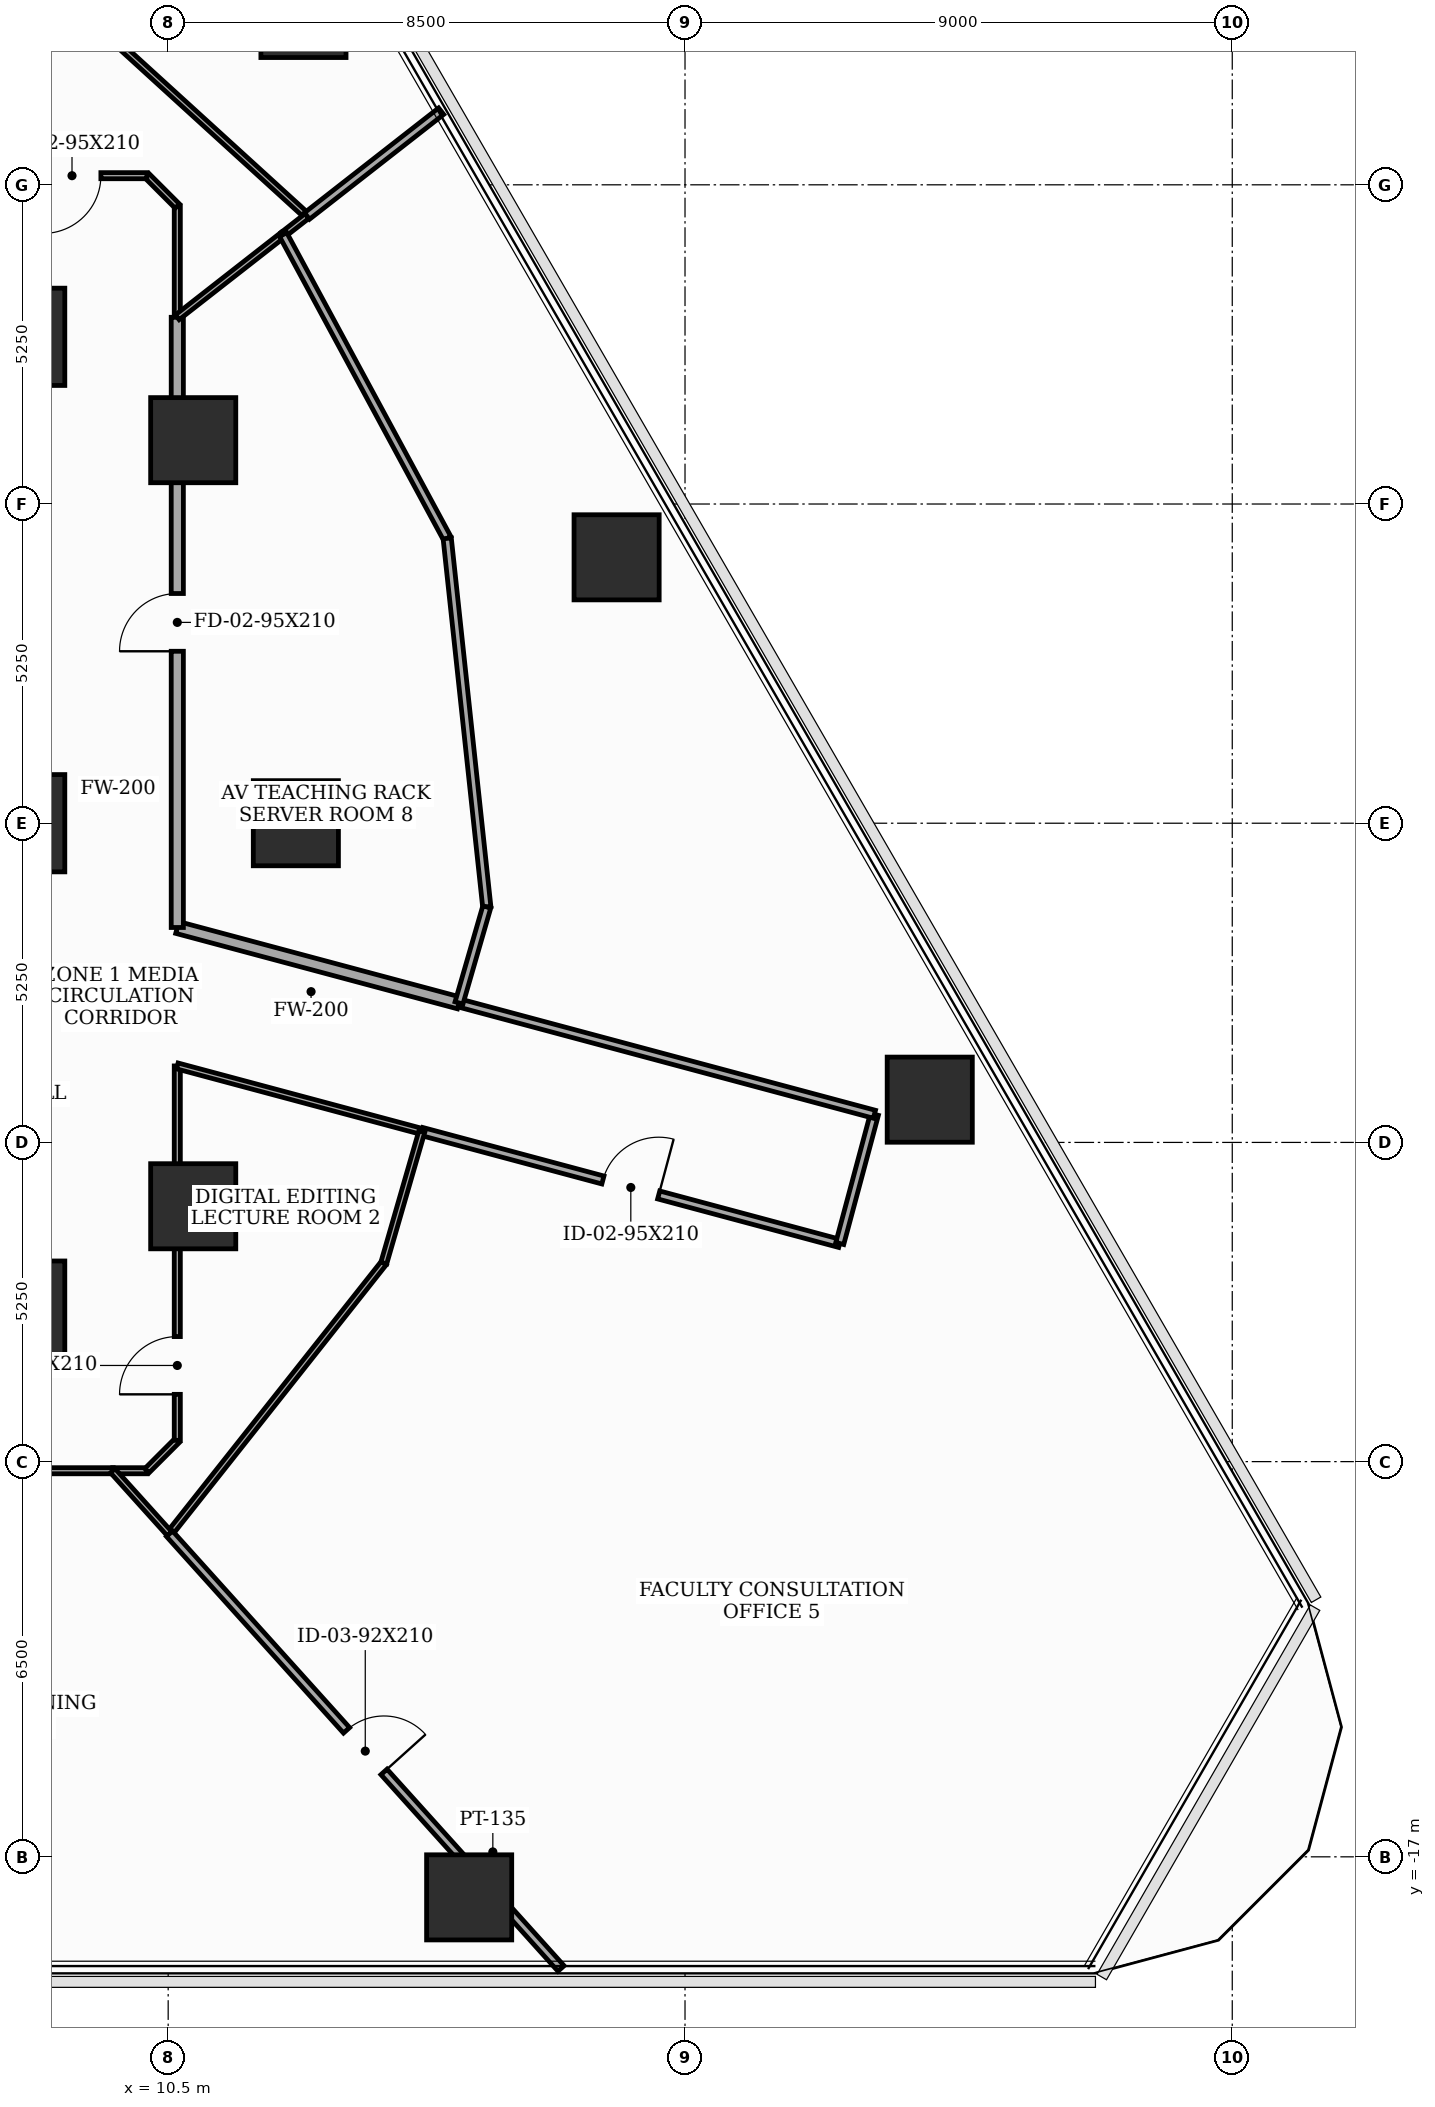
"""IFC4 building model, lengths in metres.
Left out: names, types, materials, properties, quantities, classifications, styles, units other than length and angle.
Written with IfcOpenShell. Run it as: python <this file> out.ifc"""

import sys

from ifc_helpers import new_model, si_unit, direction, frame, frame_2d, origin, origin_2d, place, context, subcontext, project, spatial, rectangle, extrude, element, fill, save


model = new_model("IFC4")
c1 = context("Model", 3, precision=1e-05, world=origin(), true_north=direction((0.0, 1.0)))
c2 = subcontext(c1, "Body", "Model", "MODEL_VIEW")
j1 = project(units=[si_unit("LENGTHUNIT", "METRE"), si_unit("PLANEANGLEUNIT", "RADIAN")], contexts=[c1])
p1 = place(None, origin())
s1 = spatial("IfcSite", under=j1, at=p1, CompositionType="ELEMENT")
p2 = place(p1, origin())
s2 = spatial("IfcBuilding", under=s1, at=p2, CompositionType="ELEMENT")
p3 = place(p2, frame((0.0, 0.0, 48.2)))
s3 = spatial("IfcBuildingStorey", under=s2, at=p3, CompositionType="ELEMENT", Elevation=48.2)
for number, where, z_axis, x_axis in (
    (1, (8.0, -8.0, 0.0), (0.0, 0.0, 1.0), (1.0, 0.0, 0.0)),
    (2, (8.0, 0.0, 0.0), (0.0, 0.0, 1.0), (1.0, 0.0, 0.0)),
    (3, (8.0, 8.0, 0.0), (0.0, 0.0, 1.0), (1.0, 0.0, 0.0)),
):
    element("IfcColumn", number, at=place(p3, frame(where, z_axis=z_axis, x_axis=x_axis)), inside=s3, PredefinedType="COLUMN", context=c2, shape_type="SweptSolid", body=[
        extrude(rectangle(XDim=1.6, YDim=1.6, at=origin_2d()), origin(), (0.0, 0.0, 1.0), 3.7),
    ])
for number, where, z_axis, x_axis in (
    (4, (12.6, 0.0, 0.0), (0.0, 0.0, 1.0), (1.0, 0.0, 0.0)),
    (5, (10.912, 6.3, 0.0), (0.0, 0.0, 1.0), (1.0, 0.0, 0.0)),
    (6, (10.912, -6.3, 0.0), (0.0, 0.0, 1.0), (1.0, 0.0, 0.0)),
    (7, (15.45, -17.667, 0.0), (0.0, 0.0, 1.0), (1.0, 0.0, 0.0)),
    (8, (23.025, -4.547, 0.0), (0.0, 0.0, 1.0), (1.0, 0.0, 0.0)),
    (9, (17.875, 4.373, 0.0), (0.0, 0.0, 1.0), (1.0, 0.0, 0.0)),
    (10, (12.725, 13.293, 0.0), (0.0, 0.0, 1.0), (1.0, 0.0, 0.0)),
):
    element("IfcColumn", number, at=place(p3, frame(where, z_axis=z_axis, x_axis=x_axis)), inside=s3, PredefinedType="COLUMN", context=c2, shape_type="SweptSolid", body=[
        extrude(rectangle(XDim=1.4, YDim=1.4, at=origin_2d()), origin(), (0.0, 0.0, 1.0), 3.7),
    ])
p4 = place(p3, frame((10.65, 8.321, 0.0), z_axis=(0.0, 0.0, 1.0), x_axis=(0.0, 1.0, 0.0)))
e11 = element("IfcWall", 11, at=p4, inside=s3, PredefinedType="MOVABLE", context=c2, shape_type="SweptSolid", body=[
    extrude(rectangle(XDim=1.829, YDim=0.1, at=frame_2d((0.915, 0.0))), origin(), (0.0, 0.0, 1.0), 3.5),
])
p5 = place(p3, frame((10.65, 10.15, 0.0), z_axis=(0.0, 0.0, 1.0), x_axis=(-0.707106781187, 0.707106781187, 0.0)))
e12 = element("IfcWall", 12, at=p5, inside=s3, PredefinedType="MOVABLE", context=c2, shape_type="SweptSolid", body=[
    extrude(rectangle(XDim=0.707, YDim=0.1, at=frame_2d((0.354, 0.0))), origin(), (0.0, 0.0, 1.0), 3.5),
])
p6 = place(p3, frame((10.15, 10.65, 0.0), z_axis=(0.0, 0.0, 1.0), x_axis=(-1.0, 0.0, 0.0)))
e13 = element("IfcWall", 13, at=p6, inside=s3, PredefinedType="MOVABLE", context=c2, shape_type="SweptSolid", body=[
    extrude(rectangle(XDim=6.158, YDim=0.1, at=frame_2d((3.079, 0.0))), origin(), (0.0, 0.0, 1.0), 2.685),
])
p7 = place(p6, frame((0.757, 0.0, 0.0)))
e14 = element("IfcOpeningElement", 14, at=p7, cuts=e13, PredefinedType="OPENING", context=c2, shape_type="SweptSolid", body=[
    extrude(rectangle(XDim=0.95, YDim=2.1, at=frame_2d((0.475, 1.05))), frame((0.0, 0.06, 0.0), z_axis=(0.0, -1.0, 0.0), x_axis=(1.0, 0.0, 0.0)), (0.0, 0.0, 1.0), 0.12),
])
p8 = place(p3, frame((9.589, -10.65, 0.0), z_axis=(0.0, 0.0, 1.0), x_axis=(1.0, 0.0, 0.0)))
e15 = element("IfcWall", 15, at=p8, inside=s3, PredefinedType="MOVABLE", context=c2, shape_type="SweptSolid", body=[
    extrude(rectangle(XDim=0.561, YDim=0.1, at=frame_2d((0.28, 0.0))), origin(), (0.0, 0.0, 1.0), 3.5),
])
p9 = place(p3, frame((10.15, -10.65, 0.0), z_axis=(0.0, 0.0, 1.0), x_axis=(0.707106781187, 0.707106781187, 0.0)))
e16 = element("IfcWall", 16, at=p9, inside=s3, PredefinedType="MOVABLE", context=c2, shape_type="SweptSolid", body=[
    extrude(rectangle(XDim=0.707, YDim=0.1, at=frame_2d((0.354, 0.0))), origin(), (0.0, 0.0, 1.0), 3.5),
])
p10 = place(p3, frame((10.65, -10.15, 0.0), z_axis=(0.0, 0.0, 1.0), x_axis=(0.0, 1.0, 0.0)))
e17 = element("IfcWall", 17, at=p10, inside=s3, PredefinedType="MOVABLE", context=c2, shape_type="SweptSolid", body=[
    extrude(rectangle(XDim=6.158, YDim=0.1, at=frame_2d((3.079, 0.0))), origin(), (0.0, 0.0, 1.0), 2.785),
])
p11 = place(p10, frame((0.757, 0.0, 0.0)))
e18 = element("IfcOpeningElement", 18, at=p11, cuts=e17, PredefinedType="OPENING", context=c2, shape_type="SweptSolid", body=[
    extrude(rectangle(XDim=0.95, YDim=2.1, at=frame_2d((0.475, 1.05))), frame((0.0, 0.06, 0.0), z_axis=(0.0, -1.0, 0.0), x_axis=(1.0, 0.0, 0.0)), (0.0, 0.0, 1.0), 0.12),
])
p12 = place(p3, frame((10.65, -3.992, 0.0), z_axis=(0.0, 0.0, 1.0), x_axis=(0.965903293856, -0.258903122651, 0.0)))
e19 = element("IfcWall", 19, at=p12, inside=s3, PredefinedType="MOVABLE", context=c2, shape_type="SweptSolid", body=[
    extrude(rectangle(XDim=4.164, YDim=0.1, at=frame_2d((2.082, 0.0))), origin(), (0.0, 0.0, 1.0), 2.785),
])
p13 = place(p3, frame((14.672, -5.07, 0.0), z_axis=(0.0, 0.0, 1.0), x_axis=(0.965908991917, -0.258881863664, 0.0)))
e20 = element("IfcWall", 20, at=p13, inside=s3, PredefinedType="PARTITIONING", context=c2, shape_type="SweptSolid", body=[
    extrude(rectangle(XDim=7.115, YDim=0.135, at=frame_2d((3.558, 0.0))), origin(), (0.0, 0.0, 1.0), 2.935),
])
p14 = place(p13, frame((3.083, 0.0, 0.0)))
e21 = element("IfcOpeningElement", 21, at=p14, cuts=e20, PredefinedType="OPENING", context=c2, shape_type="SweptSolid", body=[
    extrude(rectangle(XDim=0.95, YDim=2.1, at=frame_2d((0.475, 1.05))), frame((0.0, 0.077, 0.0), z_axis=(0.0, -1.0, 0.0), x_axis=(1.0, 0.0, 0.0)), (0.0, 0.0, 1.0), 0.155),
])
p15 = place(p3, frame((21.545, -6.912, 0.0), z_axis=(0.0, 0.0, 1.0), x_axis=(0.259105843213, 0.965848933329, 0.0)))
e22 = element("IfcWall", 22, at=p15, inside=s3, PredefinedType="PARTITIONING", context=c2, shape_type="SweptSolid", body=[
    extrude(rectangle(XDim=2.2, YDim=0.135, at=frame_2d((1.1, 0.0))), origin(), (0.0, 0.0, 1.0), 2.935),
])
p16 = place(p3, frame((22.115, -4.787, 0.0), z_axis=(0.0, 0.0, 1.0), x_axis=(-0.96591107063, 0.258874107695, 0.0)))
e23 = element("IfcWall", 23, at=p16, inside=s3, PredefinedType="PARTITIONING", context=c2, shape_type="SweptSolid", body=[
    extrude(rectangle(XDim=7.073, YDim=0.135, at=frame_2d((3.537, 0.0))), origin(), (0.0, 0.0, 1.0), 3.085),
])
p17 = place(p3, frame((15.283, -2.956, 0.0), z_axis=(0.0, 0.0, 1.0), x_axis=(-0.96594964167, 0.258730148528, 0.0)))
e24 = element("IfcWall", 24, at=p17, inside=s3, PredefinedType="SOLIDWALL", context=c2, shape_type="SweptSolid", body=[
    extrude(rectangle(XDim=4.796, YDim=0.2, at=frame_2d((2.398, 0.0))), origin(), (0.0, 0.0, 1.0), 2.785),
])
p18 = place(p3, frame((10.65, -1.715, 0.0), z_axis=(0.0, 0.0, 1.0), x_axis=(0.0, 1.0, 0.0)))
e25 = element("IfcWall", 25, at=p18, inside=s3, PredefinedType="SOLIDWALL", context=c2, shape_type="SweptSolid", body=[
    extrude(rectangle(XDim=10.036, YDim=0.2, at=frame_2d((5.018, 0.0))), origin(), (0.0, 0.0, 1.0), 2.785),
])
p19 = place(p18, frame((4.543, 0.0, 0.0)))
e26 = element("IfcOpeningElement", 26, at=p19, cuts=e25, PredefinedType="OPENING", context=c2, shape_type="SweptSolid", body=[
    extrude(rectangle(XDim=0.95, YDim=2.1, at=frame_2d((0.475, 1.05))), frame((0.0, 0.11, 0.0), z_axis=(0.0, -1.0, 0.0), x_axis=(1.0, 0.0, 0.0)), (0.0, 0.0, 1.0), 0.22),
])
p20 = place(p3, frame((2.45, -10.65, 0.0), z_axis=(0.0, 0.0, 1.0), x_axis=(1.0, 0.0, 0.0)))
e27 = element("IfcWall", 27, at=p20, inside=s3, PredefinedType="MOVABLE", context=c2, shape_type="SweptSolid", body=[
    extrude(rectangle(XDim=7.139, YDim=0.1, at=frame_2d((3.57, 0.0))), origin(), (0.0, 0.0, 1.0), 2.785),
])
p21 = place(p3, frame((12.783, 9.987, 0.0), z_axis=(0.0, 0.0, 1.0), x_axis=(-0.739244565006, 0.6734370595, 0.0)))
e28 = element("IfcWall", 28, at=p21, inside=s3, PredefinedType="MOVABLE", context=c2, shape_type="SweptSolid", body=[
    extrude(rectangle(XDim=5.88, YDim=0.1, at=frame_2d((2.94, 0.0))), origin(), (0.0, 0.0, 1.0), 2.685),
])
p22 = place(p3, frame((12.391, 9.681, 0.0), z_axis=(0.0, 0.0, 1.0), x_axis=(0.788002042991, 0.615672624243, 0.0)))
e29 = element("IfcWall", 29, at=p22, inside=s3, PredefinedType="MOVABLE", context=c2, shape_type="SweptSolid", body=[
    extrude(rectangle(XDim=0.497, YDim=0.1, at=frame_2d((0.249, 0.0))), origin(), (0.0, 0.0, 1.0), 3.5),
])
p23 = place(p3, frame((10.65, 8.321, 0.0), z_axis=(0.0, 0.0, 1.0), x_axis=(0.788124883644, 0.615515367624, 0.0)))
e30 = element("IfcWall", 30, at=p23, inside=s3, PredefinedType="MOVABLE", context=c2, shape_type="SweptSolid", body=[
    extrude(rectangle(XDim=2.209, YDim=0.1, at=frame_2d((1.104, 0.0))), origin(), (0.0, 0.0, 1.0), 3.085),
])
p24 = place(p3, frame((10.522, -11.686, 0.0), z_axis=(0.0, 0.0, 1.0), x_axis=(0.620628051287, 0.784105108997, 0.0)))
e31 = element("IfcWall", 31, at=p24, inside=s3, PredefinedType="MOVABLE", context=c2, shape_type="SweptSolid", body=[
    extrude(rectangle(XDim=5.678, YDim=0.1, at=frame_2d((2.839, 0.0))), origin(), (0.0, 0.0, 1.0), 3.5),
])
p25 = place(p3, frame((14.046, -7.234, 0.0), z_axis=(0.0, 0.0, 1.0), x_axis=(0.277997548775, 0.960581783543, 0.0)))
e32 = element("IfcWall", 32, at=p25, inside=s3, PredefinedType="MOVABLE", context=c2, shape_type="SweptSolid", body=[
    extrude(rectangle(XDim=2.253, YDim=0.1, at=frame_2d((1.126, 0.0))), origin(), (0.0, 0.0, 1.0), 3.5),
])
p26 = place(p3, frame((9.589, -10.65, 0.0), z_axis=(0.0, 0.0, 1.0), x_axis=(0.669100165698, -0.743172233243, 0.0)))
e33 = element("IfcWall", 33, at=p26, inside=s3, PredefinedType="MOVABLE", context=c2, shape_type="SweptSolid", body=[
    extrude(rectangle(XDim=1.394, YDim=0.1, at=frame_2d((0.697, 0.0))), origin(), (0.0, 0.0, 1.0), 3.5),
])
p27 = place(p3, frame((12.783, 9.987, 0.0), z_axis=(0.0, 0.0, 1.0), x_axis=(0.788064029995, 0.615593278576, 0.0)))
e34 = element("IfcWall", 34, at=p27, inside=s3, PredefinedType="PARTITIONING", context=c2, shape_type="SweptSolid", body=[
    extrude(rectangle(XDim=2.8, YDim=0.135, at=frame_2d((1.4, 0.0))), origin(), (0.0, 0.0, 1.0), 2.935),
])
p28 = place(p3, frame((12.391, 9.681, 0.0), z_axis=(0.0, 0.0, 1.0), x_axis=(0.475181539821, -0.879887779329, 0.0)))
e35 = element("IfcWall", 35, at=p28, inside=s3, PredefinedType="PARTITIONING", context=c2, shape_type="SweptSolid", body=[
    extrude(rectangle(XDim=5.678, YDim=0.135, at=frame_2d((2.839, 0.0))), origin(), (0.0, 0.0, 1.0), 3.5),
])
p29 = place(p3, frame((15.089, 4.685, 0.0), z_axis=(0.0, 0.0, 1.0), x_axis=(0.106756517352, -0.994285193495, 0.0)))
e36 = element("IfcWall", 36, at=p29, inside=s3, PredefinedType="PARTITIONING", context=c2, shape_type="SweptSolid", body=[
    extrude(rectangle(XDim=6.097, YDim=0.135, at=frame_2d((3.048, 0.0))), origin(), (0.0, 0.0, 1.0), 2.685),
])
p30 = place(p3, frame((15.74, -1.377, 0.0), z_axis=(0.0, 0.0, 1.0), x_axis=(-0.2780148037, -0.960576789707, 0.0)))
e37 = element("IfcWall", 37, at=p30, inside=s3, PredefinedType="PARTITIONING", context=c2, shape_type="SweptSolid", body=[
    extrude(rectangle(XDim=1.644, YDim=0.135, at=frame_2d((0.822, 0.0))), origin(), (0.0, 0.0, 1.0), 2.685),
])
p31 = place(p3, frame((10.522, -11.686, 0.0), z_axis=(0.0, 0.0, 1.0), x_axis=(0.669132925935, -0.743142736915, 0.0)))
e38 = element("IfcWall", 38, at=p31, inside=s3, PredefinedType="PARTITIONING", context=c2, shape_type="SweptSolid", body=[
    extrude(rectangle(XDim=9.623, YDim=0.135, at=frame_2d((4.811, 0.0))), origin(), (0.0, 0.0, 1.0), 2.935),
])
p32 = place(p31, frame((4.351, 0.0, 0.0)))
e39 = element("IfcOpeningElement", 39, at=p32, cuts=e38, PredefinedType="OPENING", context=c2, shape_type="SweptSolid", body=[
    extrude(rectangle(XDim=0.92, YDim=2.1, at=frame_2d((0.46, 1.05))), frame((0.0, 0.077, 0.0), z_axis=(0.0, -1.0, 0.0), x_axis=(1.0, 0.0, 0.0)), (0.0, 0.0, 1.0), 0.155),
])
p33 = place(p7, origin())
e40 = element("IfcDoor", 40, at=p33, inside=s3, OperationType="SINGLE_SWING_RIGHT", PredefinedType="DOOR", context=c2, shape_type="SweptSolid", body=[
    extrude(rectangle(XDim=0.95, YDim=2.1, at=frame_2d((0.475, 1.05))), frame((0.0, 0.025, 0.0), z_axis=(0.0, -1.0, 0.0), x_axis=(1.0, 0.0, 0.0)), (0.0, 0.0, 1.0), 0.05),
])
fill(e14, e40)
p34 = place(p11, origin())
e41 = element("IfcDoor", 41, at=p34, inside=s3, OperationType="SINGLE_SWING_LEFT", PredefinedType="DOOR", context=c2, shape_type="SweptSolid", body=[
    extrude(rectangle(XDim=0.95, YDim=2.1, at=frame_2d((0.475, 1.05))), frame((0.0, 0.025, 0.0), z_axis=(0.0, -1.0, 0.0), x_axis=(1.0, 0.0, 0.0)), (0.0, 0.0, 1.0), 0.05),
])
fill(e18, e41)
p35 = place(p14, origin())
e42 = element("IfcDoor", 42, at=p35, inside=s3, OperationType="SINGLE_SWING_RIGHT", PredefinedType="DOOR", context=c2, shape_type="SweptSolid", body=[
    extrude(rectangle(XDim=0.95, YDim=2.1, at=frame_2d((0.475, 1.05))), frame((0.0, 0.025, 0.0), z_axis=(0.0, -1.0, 0.0), x_axis=(1.0, 0.0, 0.0)), (0.0, 0.0, 1.0), 0.05),
])
fill(e21, e42)
p36 = place(p19, origin())
e43 = element("IfcDoor", 43, at=p36, inside=s3, OperationType="SINGLE_SWING_LEFT", PredefinedType="DOOR", context=c2, shape_type="SweptSolid", body=[
    extrude(rectangle(XDim=0.95, YDim=2.1, at=frame_2d((0.475, 1.05))), frame((0.0, 0.025, 0.0), z_axis=(0.0, -1.0, 0.0), x_axis=(1.0, 0.0, 0.0)), (0.0, 0.0, 1.0), 0.05),
])
fill(e26, e43)
p37 = place(p32, origin())
e44 = element("IfcDoor", 44, at=p37, inside=s3, OperationType="SINGLE_SWING_RIGHT", PredefinedType="DOOR", context=c2, shape_type="SweptSolid", body=[
    extrude(rectangle(XDim=0.92, YDim=2.1, at=frame_2d((0.46, 1.05))), frame((0.0, 0.025, 0.0), z_axis=(0.0, -1.0, 0.0), x_axis=(1.0, 0.0, 0.0)), (0.0, 0.0, 1.0), 0.05),
])
fill(e39, e44)
save(model, sys.argv[1])
